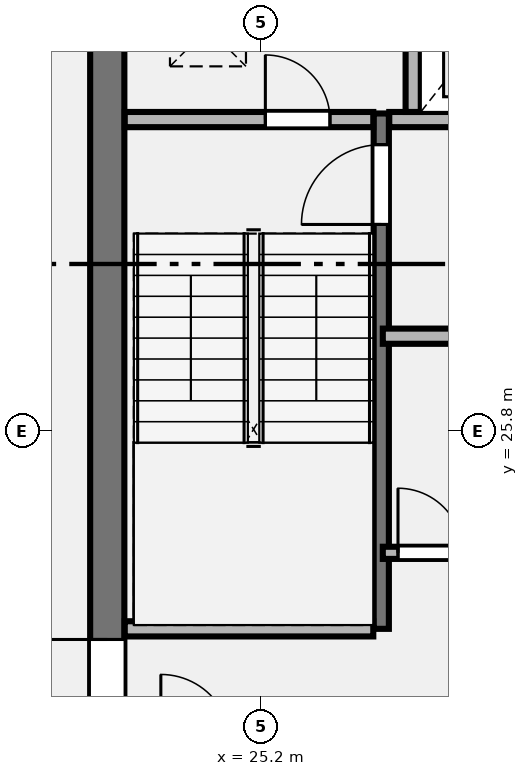
"""IFC4 building model, lengths in metres.
Left out: names, types, materials, properties, quantities, classifications, styles, units other than length and angle.
Written with IfcOpenShell. Run it as: python <this file> out.ifc"""

import sys

from ifc_helpers import new_model, si_unit, direction, frame, frame_2d, origin, place, context, subcontext, project, spatial, rectangle, extrude, element, fill, save


model = new_model("IFC4")
c1 = context("Model", 3, precision=1e-05, world=origin(), true_north=direction((0.0, 1.0)))
c2 = subcontext(c1, "Body", "Model", "MODEL_VIEW")
j1 = project(units=[si_unit("LENGTHUNIT", "METRE"), si_unit("PLANEANGLEUNIT", "RADIAN")], contexts=[c1])
p1 = place(None, origin())
s1 = spatial("IfcSite", under=j1, at=p1, CompositionType="ELEMENT")
p2 = place(p1, origin())
s2 = spatial("IfcBuilding", under=s1, at=p2, CompositionType="ELEMENT")
p3 = place(p2, frame((0.0, 0.0, 227.0)))
s3 = spatial("IfcBuildingStorey", under=s2, at=p3, CompositionType="ELEMENT", Elevation=227.0)
p4 = place(p3, frame((23.175, 19.0, 0.0), z_axis=(0.0, 0.0, 1.0), x_axis=(0.0, 1.0, 0.0)))
e1 = element("IfcWall", 1, at=p4, inside=s3, PredefinedType="SHEAR", context=c2, shape_type="SweptSolid", body=[
    extrude(rectangle(XDim=13.8, YDim=0.45, at=frame_2d((6.9, 0.0))), origin(), (0.0, 0.0, 1.0), 3.45),
])
p5 = place(p4, frame((2.84, 0.0, 0.0)))
e2 = element("IfcOpeningElement", 2, at=p5, cuts=e1, PredefinedType="OPENING", context=c2, shape_type="SweptSolid", body=[
    extrude(rectangle(XDim=1.22, YDim=2.25, at=frame_2d((0.61, 1.125))), frame((0.0, 0.235, 0.0), z_axis=(0.0, -1.0, 0.0), x_axis=(1.0, 0.0, 0.0)), (0.0, 0.0, 1.0), 0.47),
])
p6 = place(p3, frame((26.78, 23.2, 0.0), z_axis=(0.0, 0.0, 1.0), x_axis=(0.0, 1.0, 0.0)))
e3 = element("IfcWall", 3, at=p6, inside=s3, PredefinedType="SHEAR", context=c2, shape_type="SweptSolid", body=[
    extrude(rectangle(XDim=6.78, YDim=0.2, at=frame_2d((3.39, 0.0))), origin(), (0.0, 0.0, 1.0), 3.65),
])
p7 = place(p6, frame((5.32, 0.0, 0.0)))
e4 = element("IfcOpeningElement", 4, at=p7, cuts=e3, PredefinedType="OPENING", context=c2, shape_type="SweptSolid", body=[
    extrude(rectangle(XDim=1.05, YDim=2.15, at=frame_2d((0.525, 1.075))), frame((0.0, 0.11, 0.0), z_axis=(0.0, -1.0, 0.0), x_axis=(1.0, 0.0, 0.0)), (0.0, 0.0, 1.0), 0.22),
])
p8 = place(p3, frame((23.405, 23.2, 0.0), z_axis=(0.0, 0.0, 1.0), x_axis=(1.0, 0.0, 0.0)))
e5 = element("IfcWall", 5, at=p8, inside=s3, PredefinedType="PLUMBINGWALL", context=c2, shape_type="SweptSolid", body=[
    extrude(rectangle(XDim=3.27, YDim=0.2, at=frame_2d((1.635, 0.0))), origin(), (0.0, 0.0, 1.0), 3.45),
])
p9 = place(p3, frame((23.405, 29.9, 0.0), z_axis=(0.0, 0.0, 1.0), x_axis=(1.0, 0.0, 0.0)))
e6 = element("IfcWall", 6, at=p9, inside=s3, PredefinedType="PLUMBINGWALL", context=c2, shape_type="SweptSolid", body=[
    extrude(rectangle(XDim=3.27, YDim=0.2, at=frame_2d((1.635, 0.0))), origin(), (0.0, 0.0, 1.0), 3.45),
])
p10 = place(p9, frame((1.85, 0.0, 0.0)))
e7 = element("IfcOpeningElement", 7, at=p10, cuts=e6, PredefinedType="OPENING", context=c2, shape_type="SweptSolid", body=[
    extrude(rectangle(XDim=0.85, YDim=2.05, at=frame_2d((0.425, 1.025))), frame((0.0, 0.11, 0.0), z_axis=(0.0, -1.0, 0.0), x_axis=(1.0, 0.0, 0.0)), (0.0, 0.0, 1.0), 0.22),
])
p11 = place(p3, frame((26.885, 29.9, 0.0), z_axis=(0.0, 0.0, 1.0), x_axis=(1.0, 0.0, 0.0)))
e8 = element("IfcWall", 8, at=p11, inside=s3, PredefinedType="PLUMBINGWALL", context=c2, shape_type="SweptSolid", body=[
    extrude(rectangle(XDim=3.015, YDim=0.2, at=frame_2d((1.507, 0.0))), origin(), (0.0, 0.0, 1.0), 3.45),
])
p12 = place(p11, frame((0.94, 0.0, 0.0)))
e9 = element("IfcOpeningElement", 9, at=p12, cuts=e8, PredefinedType="OPENING", context=c2, shape_type="SweptSolid", body=[
    extrude(rectangle(XDim=1.15, YDim=2.2, at=frame_2d((0.575, 1.1))), frame((0.0, 0.11, 0.0), z_axis=(0.0, -1.0, 0.0), x_axis=(1.0, 0.0, 0.0)), (0.0, 0.0, 1.0), 0.22),
])
p13 = place(p3, frame((27.2, 30.0, 0.0), z_axis=(0.0, 0.0, 1.0), x_axis=(0.0, 1.0, 0.0)))
e10 = element("IfcWall", 10, at=p13, inside=s3, PredefinedType="PLUMBINGWALL", context=c2, shape_type="SweptSolid", body=[
    extrude(rectangle(XDim=2.85, YDim=0.2, at=frame_2d((1.425, 0.0))), origin(), (0.0, 0.0, 1.0), 3.45),
])
p14 = place(p3, frame((26.8, 27.05, 0.0), z_axis=(0.0, 0.0, 1.0), x_axis=(1.0, 0.0, 0.0)))
e11 = element("IfcWall", 11, at=p14, inside=s3, PredefinedType="PLUMBINGWALL", context=c2, shape_type="SweptSolid", body=[
    extrude(rectangle(XDim=3.2, YDim=0.2, at=frame_2d((1.6, 0.0))), origin(), (0.0, 0.0, 1.0), 3.45),
])
p15 = place(p3, frame((26.8, 24.2, 0.0), z_axis=(0.0, 0.0, 1.0), x_axis=(1.0, 0.0, 0.0)))
e12 = element("IfcWall", 12, at=p15, inside=s3, PredefinedType="PARTITIONING", context=c2, shape_type="SweptSolid", body=[
    extrude(rectangle(XDim=3.2, YDim=0.16, at=frame_2d((1.6, 0.0))), origin(), (0.0, 0.0, 1.0), 3.45),
])
p16 = place(p15, frame((0.2, 0.0, 0.0)))
e13 = element("IfcOpeningElement", 13, at=p16, cuts=e12, PredefinedType="OPENING", context=c2, shape_type="SweptSolid", body=[
    extrude(rectangle(XDim=0.85, YDim=2.05, at=frame_2d((0.425, 1.025))), frame((0.0, 0.09, 0.0), z_axis=(0.0, -1.0, 0.0), x_axis=(1.0, 0.0, 0.0)), (0.0, 0.0, 1.0), 0.18),
])
p17 = place(p15, frame((1.8, 0.0, 0.0)))
e14 = element("IfcOpeningElement", 14, at=p17, cuts=e12, PredefinedType="OPENING", context=c2, shape_type="SweptSolid", body=[
    extrude(rectangle(XDim=0.85, YDim=2.05, at=frame_2d((0.425, 1.025))), frame((0.0, 0.09, 0.0), z_axis=(0.0, -1.0, 0.0), x_axis=(1.0, 0.0, 0.0)), (0.0, 0.0, 1.0), 0.18),
])
p18 = place(p5, origin())
e15 = element("IfcDoor", 15, at=p18, inside=s3, OperationType="SINGLE_SWING_RIGHT", PredefinedType="DOOR", context=c2, shape_type="SweptSolid", body=[
    extrude(rectangle(XDim=1.22, YDim=2.25, at=frame_2d((0.61, 1.125))), frame((0.0, 0.025, 0.0), z_axis=(0.0, -1.0, 0.0), x_axis=(1.0, 0.0, 0.0)), (0.0, 0.0, 1.0), 0.05),
])
fill(e2, e15)
p19 = place(p7, origin())
e16 = element("IfcDoor", 16, at=p19, inside=s3, OperationType="SINGLE_SWING_LEFT", PredefinedType="DOOR", context=c2, shape_type="SweptSolid", body=[
    extrude(rectangle(XDim=1.05, YDim=2.15, at=frame_2d((0.525, 1.075))), frame((0.0, 0.025, 0.0), z_axis=(0.0, -1.0, 0.0), x_axis=(1.0, 0.0, 0.0)), (0.0, 0.0, 1.0), 0.05),
])
fill(e4, e16)
p20 = place(p10, origin())
e17 = element("IfcDoor", 17, at=p20, inside=s3, OperationType="SINGLE_SWING_LEFT", PredefinedType="DOOR", context=c2, shape_type="SweptSolid", body=[
    extrude(rectangle(XDim=0.85, YDim=2.05, at=frame_2d((0.425, 1.025))), frame((0.0, 0.025, 0.0), z_axis=(0.0, -1.0, 0.0), x_axis=(1.0, 0.0, 0.0)), (0.0, 0.0, 1.0), 0.05),
])
fill(e7, e17)
p21 = place(p16, origin())
e18 = element("IfcDoor", 18, at=p21, inside=s3, OperationType="SINGLE_SWING_LEFT", PredefinedType="DOOR", context=c2, shape_type="SweptSolid", body=[
    extrude(rectangle(XDim=0.85, YDim=2.05, at=frame_2d((0.425, 1.025))), frame((0.0, 0.025, 0.0), z_axis=(0.0, -1.0, 0.0), x_axis=(1.0, 0.0, 0.0)), (0.0, 0.0, 1.0), 0.05),
])
fill(e13, e18)
save(model, sys.argv[1])
